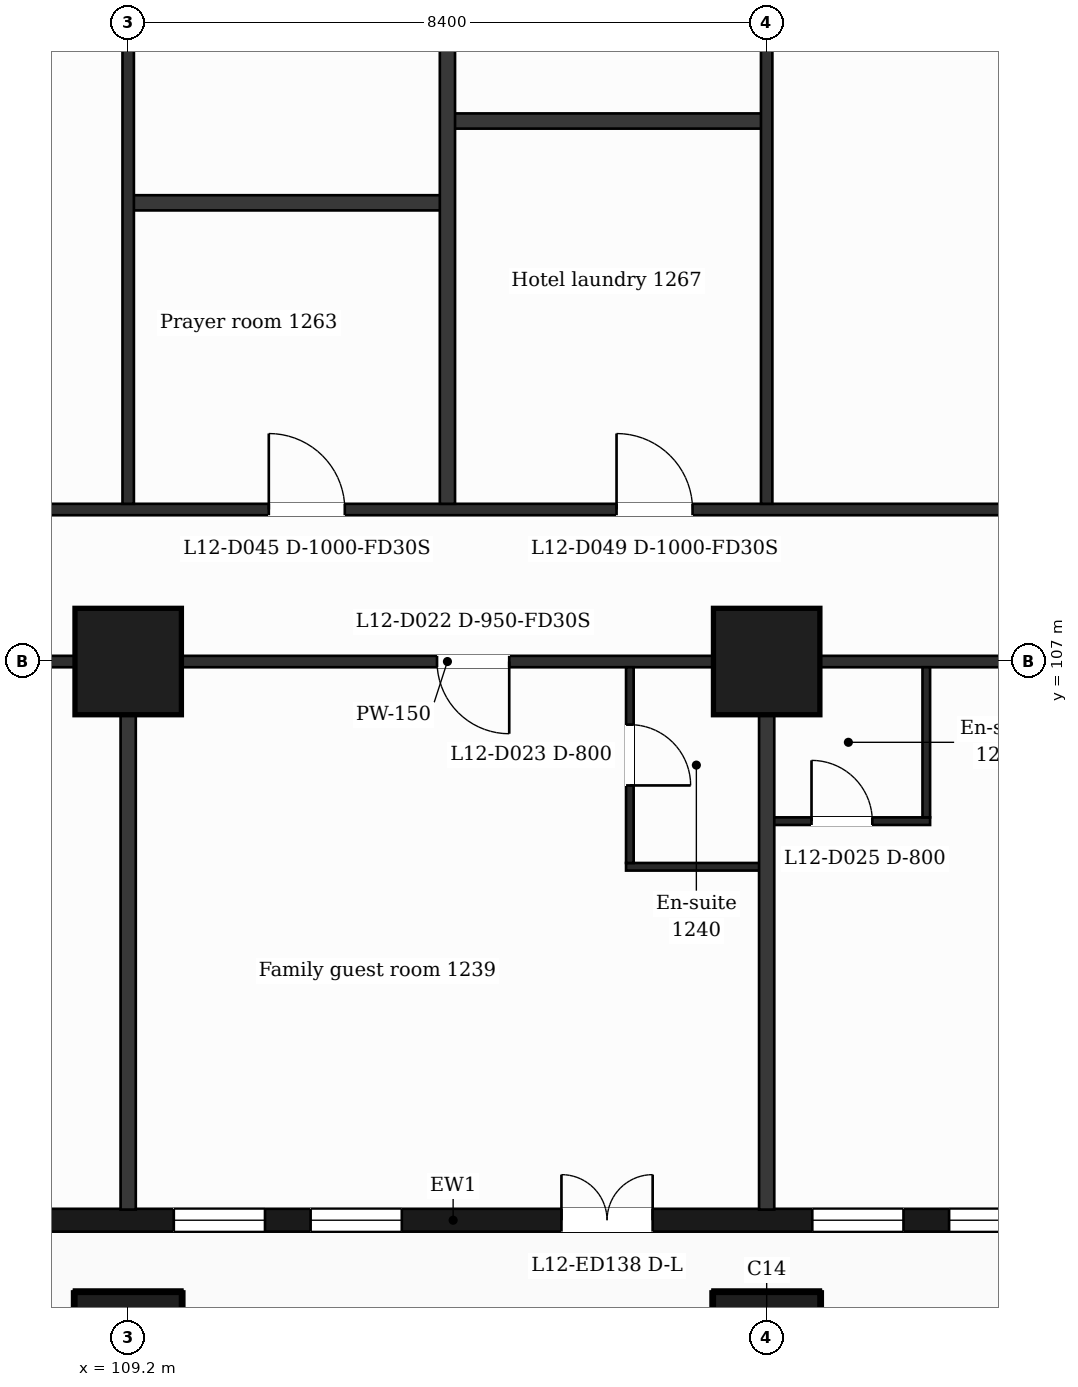
"""IFC4 building model, lengths in metres.
Left out: names, types, materials, properties, quantities, classifications, styles, units other than length and angle.
Written with IfcOpenShell. Run it as: python <this file> out.ifc"""

import sys

from ifc_helpers import new_model, si_unit, direction, frame, frame_2d, origin, origin_2d, place, context, subcontext, project, spatial, rectangle, extrude, element, fill, save


model = new_model("IFC4")
c1 = context("Model", 3, precision=1e-05, world=origin(), true_north=direction((0.0, 1.0)))
c2 = subcontext(c1, "Body", "Model", "MODEL_VIEW")
j1 = project(units=[si_unit("LENGTHUNIT", "METRE"), si_unit("PLANEANGLEUNIT", "RADIAN")], contexts=[c1])
p1 = place(None, origin())
s1 = spatial("IfcSite", under=j1, at=p1, CompositionType="ELEMENT")
p2 = place(p1, origin())
s2 = spatial("IfcBuilding", under=s1, at=p2, CompositionType="ELEMENT")
p3 = place(p2, frame((0.0, 0.0, 60.0)))
s3 = spatial("IfcBuildingStorey", under=s2, at=p3, CompositionType="ELEMENT", Elevation=60.0)
for number, where, z_axis, x_axis in (
    (1, (109.2, 98.0, 0.0), (0.0, 0.0, 1.0), (1.0, 0.0, 0.0)),
    (2, (117.6, 98.0, 0.0), (0.0, 0.0, 1.0), (1.0, 0.0, 0.0)),
    (3, (109.2, 107.0, 0.0), (0.0, 0.0, 1.0), (1.0, 0.0, 0.0)),
    (4, (117.6, 107.0, 0.0), (0.0, 0.0, 1.0), (1.0, 0.0, 0.0)),
):
    element("IfcColumn", number, at=place(p3, frame(where, z_axis=z_axis, x_axis=x_axis)), inside=s3, PredefinedType="COLUMN", context=c2, shape_type="SweptSolid", body=[
        extrude(rectangle(XDim=1.4, YDim=1.4, at=origin_2d()), origin(), (0.0, 0.0, 1.0), 3.5),
    ])
p4 = place(p3, frame((89.85, 99.65, 0.0), z_axis=(0.0, 0.0, 1.0), x_axis=(1.0, 0.0, 0.0)))
e5 = element("IfcWall", 5, at=p4, inside=s3, PredefinedType="SOLIDWALL", context=c2, shape_type="SweptSolid", body=[
    extrude(rectangle(XDim=47.25, YDim=0.3, at=frame_2d((23.625, 0.0))), origin(), (0.0, 0.0, 1.0), 3.18),
])
p5 = place(p4, frame((0.725, 0.0, 0.9)))
e6 = element("IfcOpeningElement", 6, at=p5, cuts=e5, PredefinedType="OPENING", context=c2, shape_type="SweptSolid", body=[
    extrude(rectangle(XDim=1.2, YDim=2.1, at=frame_2d((0.6, 1.05))), frame((0.0, 0.16, 0.0), z_axis=(0.0, -1.0, 0.0), x_axis=(1.0, 0.0, 0.0)), (0.0, 0.0, 1.0), 0.32),
])
p6 = place(p4, frame((3.45, 0.0, 0.9)))
e7 = element("IfcOpeningElement", 7, at=p6, cuts=e5, PredefinedType="OPENING", context=c2, shape_type="SweptSolid", body=[
    extrude(rectangle(XDim=2.4, YDim=2.1, at=frame_2d((1.2, 1.05))), frame((0.0, 0.16, 0.0), z_axis=(0.0, -1.0, 0.0), x_axis=(1.0, 0.0, 0.0)), (0.0, 0.0, 1.0), 0.32),
])
p7 = place(p4, frame((7.65, 0.0, 0.9)))
e8 = element("IfcOpeningElement", 8, at=p7, cuts=e5, PredefinedType="OPENING", context=c2, shape_type="SweptSolid", body=[
    extrude(rectangle(XDim=2.4, YDim=2.1, at=frame_2d((1.2, 1.05))), frame((0.0, 0.16, 0.0), z_axis=(0.0, -1.0, 0.0), x_axis=(1.0, 0.0, 0.0)), (0.0, 0.0, 1.0), 0.32),
])
p8 = place(p4, frame((12.45, 0.0, 0.9)))
e9 = element("IfcOpeningElement", 9, at=p8, cuts=e5, PredefinedType="OPENING", context=c2, shape_type="SweptSolid", body=[
    extrude(rectangle(XDim=1.2, YDim=2.1, at=frame_2d((0.6, 1.05))), frame((0.0, 0.16, 0.0), z_axis=(0.0, -1.0, 0.0), x_axis=(1.0, 0.0, 0.0)), (0.0, 0.0, 1.0), 0.32),
])
p9 = place(p4, frame((16.65, 0.0, 0.9)))
e10 = element("IfcOpeningElement", 10, at=p9, cuts=e5, PredefinedType="OPENING", context=c2, shape_type="SweptSolid", body=[
    extrude(rectangle(XDim=1.2, YDim=2.1, at=frame_2d((0.6, 1.05))), frame((0.0, 0.16, 0.0), z_axis=(0.0, -1.0, 0.0), x_axis=(1.0, 0.0, 0.0)), (0.0, 0.0, 1.0), 0.32),
])
p10 = place(p4, frame((19.95, 0.0, 0.9)))
e11 = element("IfcOpeningElement", 11, at=p10, cuts=e5, PredefinedType="OPENING", context=c2, shape_type="SweptSolid", body=[
    extrude(rectangle(XDim=1.2, YDim=2.1, at=frame_2d((0.6, 1.05))), frame((0.0, 0.16, 0.0), z_axis=(0.0, -1.0, 0.0), x_axis=(1.0, 0.0, 0.0)), (0.0, 0.0, 1.0), 0.32),
])
p11 = place(p4, frame((21.75, 0.0, 0.9)))
e12 = element("IfcOpeningElement", 12, at=p11, cuts=e5, PredefinedType="OPENING", context=c2, shape_type="SweptSolid", body=[
    extrude(rectangle(XDim=1.2, YDim=2.1, at=frame_2d((0.6, 1.05))), frame((0.0, 0.16, 0.0), z_axis=(0.0, -1.0, 0.0), x_axis=(1.0, 0.0, 0.0)), (0.0, 0.0, 1.0), 0.32),
])
p12 = place(p4, frame((25.05, 0.0, 0.0)))
e13 = element("IfcOpeningElement", 13, at=p12, cuts=e5, PredefinedType="OPENING", context=c2, shape_type="SweptSolid", body=[
    extrude(rectangle(XDim=1.2, YDim=2.4, at=frame_2d((0.6, 1.2))), frame((0.0, 0.16, 0.0), z_axis=(0.0, -1.0, 0.0), x_axis=(1.0, 0.0, 0.0)), (0.0, 0.0, 1.0), 0.32),
])
p13 = place(p4, frame((28.35, 0.0, 0.9)))
e14 = element("IfcOpeningElement", 14, at=p13, cuts=e5, PredefinedType="OPENING", context=c2, shape_type="SweptSolid", body=[
    extrude(rectangle(XDim=1.2, YDim=2.1, at=frame_2d((0.6, 1.05))), frame((0.0, 0.16, 0.0), z_axis=(0.0, -1.0, 0.0), x_axis=(1.0, 0.0, 0.0)), (0.0, 0.0, 1.0), 0.32),
])
p14 = place(p4, frame((30.15, 0.0, 0.9)))
e15 = element("IfcOpeningElement", 15, at=p14, cuts=e5, PredefinedType="OPENING", context=c2, shape_type="SweptSolid", body=[
    extrude(rectangle(XDim=1.2, YDim=2.1, at=frame_2d((0.6, 1.05))), frame((0.0, 0.16, 0.0), z_axis=(0.0, -1.0, 0.0), x_axis=(1.0, 0.0, 0.0)), (0.0, 0.0, 1.0), 0.32),
])
p15 = place(p4, frame((32.85, 0.0, 0.9)))
e16 = element("IfcOpeningElement", 16, at=p15, cuts=e5, PredefinedType="OPENING", context=c2, shape_type="SweptSolid", body=[
    extrude(rectangle(XDim=2.4, YDim=2.1, at=frame_2d((1.2, 1.05))), frame((0.0, 0.16, 0.0), z_axis=(0.0, -1.0, 0.0), x_axis=(1.0, 0.0, 0.0)), (0.0, 0.0, 1.0), 0.32),
])
p16 = place(p4, frame((37.05, 0.0, 0.9)))
e17 = element("IfcOpeningElement", 17, at=p16, cuts=e5, PredefinedType="OPENING", context=c2, shape_type="SweptSolid", body=[
    extrude(rectangle(XDim=2.4, YDim=2.1, at=frame_2d((1.2, 1.05))), frame((0.0, 0.16, 0.0), z_axis=(0.0, -1.0, 0.0), x_axis=(1.0, 0.0, 0.0)), (0.0, 0.0, 1.0), 0.32),
])
p17 = place(p4, frame((41.85, 0.0, 0.9)))
e18 = element("IfcOpeningElement", 18, at=p17, cuts=e5, PredefinedType="OPENING", context=c2, shape_type="SweptSolid", body=[
    extrude(rectangle(XDim=1.2, YDim=2.1, at=frame_2d((0.6, 1.05))), frame((0.0, 0.16, 0.0), z_axis=(0.0, -1.0, 0.0), x_axis=(1.0, 0.0, 0.0)), (0.0, 0.0, 1.0), 0.32),
])
p18 = place(p4, frame((45.25, 0.0, 0.9)))
e19 = element("IfcOpeningElement", 19, at=p18, cuts=e5, PredefinedType="OPENING", context=c2, shape_type="SweptSolid", body=[
    extrude(rectangle(XDim=1.2, YDim=2.1, at=frame_2d((0.6, 1.05))), frame((0.0, 0.16, 0.0), z_axis=(0.0, -1.0, 0.0), x_axis=(1.0, 0.0, 0.0)), (0.0, 0.0, 1.0), 0.32),
])
p19 = place(p3, frame((115.75, 104.3, 0.0), z_axis=(0.0, 0.0, 1.0), x_axis=(1.0, 0.0, 0.0)))
e20 = element("IfcWall", 20, at=p19, inside=s3, PredefinedType="PARTITIONING", context=c2, shape_type="SweptSolid", body=[
    extrude(rectangle(XDim=1.85, YDim=0.1, at=frame_2d((0.925, 0.0))), origin(), (0.0, 0.0, 1.0), 3.18),
])
p20 = place(p3, frame((117.6, 104.9, 0.0), z_axis=(0.0, 0.0, 1.0), x_axis=(1.0, 0.0, 0.0)))
e21 = element("IfcWall", 21, at=p20, inside=s3, PredefinedType="PARTITIONING", context=c2, shape_type="SweptSolid", body=[
    extrude(rectangle(XDim=2.15, YDim=0.1, at=frame_2d((1.075, 0.0))), origin(), (0.0, 0.0, 1.0), 3.18),
])
p21 = place(p20, frame((0.59, 0.0, 0.0)))
e22 = element("IfcOpeningElement", 22, at=p21, cuts=e21, PredefinedType="OPENING", context=c2, shape_type="SweptSolid", body=[
    extrude(rectangle(XDim=0.8, YDim=2.1, at=frame_2d((0.4, 1.05))), frame((0.0, 0.06, 0.0), z_axis=(0.0, -1.0, 0.0), x_axis=(1.0, 0.0, 0.0)), (0.0, 0.0, 1.0), 0.12),
])
p22 = place(p3, frame((87.018, 107.0, 0.0), z_axis=(0.0, 0.0, 1.0), x_axis=(1.0, 0.0, 0.0)))
e23 = element("IfcWall", 23, at=p22, inside=s3, PredefinedType="PARTITIONING", context=c2, shape_type="SweptSolid", body=[
    extrude(rectangle(XDim=52.765, YDim=0.15, at=frame_2d((26.382, 0.0))), origin(), (0.0, 0.0, 1.0), 3.18),
])
p23 = place(p22, frame((1.032, 0.0, 0.0)))
e24 = element("IfcOpeningElement", 24, at=p23, cuts=e23, PredefinedType="OPENING", context=c2, shape_type="SweptSolid", body=[
    extrude(rectangle(XDim=0.95, YDim=2.1, at=frame_2d((0.475, 1.05))), frame((0.0, 0.085, 0.0), z_axis=(0.0, -1.0, 0.0), x_axis=(1.0, 0.0, 0.0)), (0.0, 0.0, 1.0), 0.17),
])
p24 = place(p22, frame((6.894, 0.0, 0.0)))
e25 = element("IfcOpeningElement", 25, at=p24, cuts=e23, PredefinedType="OPENING", context=c2, shape_type="SweptSolid", body=[
    extrude(rectangle(XDim=0.95, YDim=2.1, at=frame_2d((0.475, 1.05))), frame((0.0, 0.085, 0.0), z_axis=(0.0, -1.0, 0.0), x_axis=(1.0, 0.0, 0.0)), (0.0, 0.0, 1.0), 0.17),
])
p25 = place(p22, frame((17.844, 0.0, 0.0)))
e26 = element("IfcOpeningElement", 26, at=p25, cuts=e23, PredefinedType="OPENING", context=c2, shape_type="SweptSolid", body=[
    extrude(rectangle(XDim=0.95, YDim=2.1, at=frame_2d((0.475, 1.05))), frame((0.0, 0.085, 0.0), z_axis=(0.0, -1.0, 0.0), x_axis=(1.0, 0.0, 0.0)), (0.0, 0.0, 1.0), 0.17),
])
p26 = place(p22, frame((26.245, 0.0, 0.0)))
e27 = element("IfcOpeningElement", 27, at=p26, cuts=e23, PredefinedType="OPENING", context=c2, shape_type="SweptSolid", body=[
    extrude(rectangle(XDim=0.95, YDim=2.1, at=frame_2d((0.475, 1.05))), frame((0.0, 0.085, 0.0), z_axis=(0.0, -1.0, 0.0), x_axis=(1.0, 0.0, 0.0)), (0.0, 0.0, 1.0), 0.17),
])
p27 = place(p22, frame((35.822, 0.0, 0.0)))
e28 = element("IfcOpeningElement", 28, at=p27, cuts=e23, PredefinedType="OPENING", context=c2, shape_type="SweptSolid", body=[
    extrude(rectangle(XDim=0.95, YDim=2.1, at=frame_2d((0.475, 1.05))), frame((0.0, 0.085, 0.0), z_axis=(0.0, -1.0, 0.0), x_axis=(1.0, 0.0, 0.0)), (0.0, 0.0, 1.0), 0.17),
])
p28 = place(p22, frame((42.302, 0.0, 0.0)))
e29 = element("IfcOpeningElement", 29, at=p28, cuts=e23, PredefinedType="OPENING", context=c2, shape_type="SweptSolid", body=[
    extrude(rectangle(XDim=0.95, YDim=2.1, at=frame_2d((0.475, 1.05))), frame((0.0, 0.085, 0.0), z_axis=(0.0, -1.0, 0.0), x_axis=(1.0, 0.0, 0.0)), (0.0, 0.0, 1.0), 0.17),
])
p29 = place(p22, frame((49.285, 0.0, 0.0)))
e30 = element("IfcOpeningElement", 30, at=p29, cuts=e23, PredefinedType="OPENING", context=c2, shape_type="SweptSolid", body=[
    extrude(rectangle(XDim=0.95, YDim=2.1, at=frame_2d((0.475, 1.05))), frame((0.0, 0.085, 0.0), z_axis=(0.0, -1.0, 0.0), x_axis=(1.0, 0.0, 0.0)), (0.0, 0.0, 1.0), 0.17),
])
p30 = place(p3, frame((100.725, 109.0, 0.0), z_axis=(0.0, 0.0, 1.0), x_axis=(1.0, 0.0, 0.0)))
e31 = element("IfcWall", 31, at=p30, inside=s3, PredefinedType="PARTITIONING", context=c2, shape_type="SweptSolid", body=[
    extrude(rectangle(XDim=25.35, YDim=0.15, at=frame_2d((12.675, 0.0))), origin(), (0.0, 0.0, 1.0), 3.18),
])
p31 = place(p30, frame((1.975, 0.0, 0.0)))
e32 = element("IfcOpeningElement", 32, at=p31, cuts=e31, PredefinedType="OPENING", context=c2, shape_type="SweptSolid", body=[
    extrude(rectangle(XDim=1.0, YDim=2.1, at=frame_2d((0.5, 1.05))), frame((0.0, 0.085, 0.0), z_axis=(0.0, -1.0, 0.0), x_axis=(1.0, 0.0, 0.0)), (0.0, 0.0, 1.0), 0.17),
])
p32 = place(p30, frame((10.325, 0.0, 0.0)))
e33 = element("IfcOpeningElement", 33, at=p32, cuts=e31, PredefinedType="OPENING", context=c2, shape_type="SweptSolid", body=[
    extrude(rectangle(XDim=1.0, YDim=2.1, at=frame_2d((0.5, 1.05))), frame((0.0, 0.085, 0.0), z_axis=(0.0, -1.0, 0.0), x_axis=(1.0, 0.0, 0.0)), (0.0, 0.0, 1.0), 0.17),
])
p33 = place(p30, frame((14.9, 0.0, 0.0)))
e34 = element("IfcOpeningElement", 34, at=p33, cuts=e31, PredefinedType="OPENING", context=c2, shape_type="SweptSolid", body=[
    extrude(rectangle(XDim=1.0, YDim=2.1, at=frame_2d((0.5, 1.05))), frame((0.0, 0.085, 0.0), z_axis=(0.0, -1.0, 0.0), x_axis=(1.0, 0.0, 0.0)), (0.0, 0.0, 1.0), 0.17),
])
p34 = place(p30, frame((22.685, 0.0, 0.0)))
e35 = element("IfcOpeningElement", 35, at=p34, cuts=e31, PredefinedType="OPENING", context=c2, shape_type="SweptSolid", body=[
    extrude(rectangle(XDim=1.0, YDim=2.1, at=frame_2d((0.5, 1.05))), frame((0.0, 0.085, 0.0), z_axis=(0.0, -1.0, 0.0), x_axis=(1.0, 0.0, 0.0)), (0.0, 0.0, 1.0), 0.17),
])
p35 = place(p3, frame((109.2, 113.035, 0.0), z_axis=(0.0, 0.0, 1.0), x_axis=(1.0, 0.0, 0.0)))
e36 = element("IfcWall", 36, at=p35, inside=s3, PredefinedType="PARTITIONING", context=c2, shape_type="SweptSolid", body=[
    extrude(rectangle(XDim=4.2, YDim=0.2, at=frame_2d((2.1, 0.0))), origin(), (0.0, 0.0, 1.0), 3.18),
])
p36 = place(p3, frame((113.4, 114.111, 0.0), z_axis=(0.0, 0.0, 1.0), x_axis=(1.0, 0.0, 0.0)))
e37 = element("IfcWall", 37, at=p36, inside=s3, PredefinedType="PARTITIONING", context=c2, shape_type="SweptSolid", body=[
    extrude(rectangle(XDim=4.2, YDim=0.2, at=frame_2d((2.1, 0.0))), origin(), (0.0, 0.0, 1.0), 3.18),
])
p37 = place(p3, frame((109.2, 99.79, 0.0), z_axis=(0.0, 0.0, 1.0), x_axis=(0.0, 1.0, 0.0)))
e38 = element("IfcWall", 38, at=p37, inside=s3, PredefinedType="PARTITIONING", context=c2, shape_type="SweptSolid", body=[
    extrude(rectangle(XDim=7.135, YDim=0.2, at=frame_2d((3.567, 0.0))), origin(), (0.0, 0.0, 1.0), 3.18),
])
p38 = place(p3, frame((109.2, 109.075, 0.0), z_axis=(0.0, 0.0, 1.0), x_axis=(0.0, 1.0, 0.0)))
e39 = element("IfcWall", 39, at=p38, inside=s3, PredefinedType="PARTITIONING", context=c2, shape_type="SweptSolid", body=[
    extrude(rectangle(XDim=13.3, YDim=0.15, at=frame_2d((6.65, 0.0))), origin(), (0.0, 0.0, 1.0), 3.18),
])
p39 = place(p38, frame((8.939, 0.0, 0.0)))
e40 = element("IfcOpeningElement", 40, at=p39, cuts=e39, PredefinedType="OPENING", context=c2, shape_type="SweptSolid", body=[
    extrude(rectangle(XDim=1.0, YDim=2.1, at=frame_2d((0.5, 1.05))), frame((0.0, 0.085, 0.0), z_axis=(0.0, -1.0, 0.0), x_axis=(1.0, 0.0, 0.0)), (0.0, 0.0, 1.0), 0.17),
])
p40 = place(p3, frame((113.4, 109.075, 0.0), z_axis=(0.0, 0.0, 1.0), x_axis=(0.0, 1.0, 0.0)))
e41 = element("IfcWall", 41, at=p40, inside=s3, PredefinedType="PARTITIONING", context=c2, shape_type="SweptSolid", body=[
    extrude(rectangle(XDim=13.3, YDim=0.2, at=frame_2d((6.65, 0.0))), origin(), (0.0, 0.0, 1.0), 3.18),
])
p41 = place(p3, frame((115.8, 104.35, 0.0), z_axis=(0.0, 0.0, 1.0), x_axis=(0.0, 1.0, 0.0)))
e42 = element("IfcWall", 42, at=p41, inside=s3, PredefinedType="PARTITIONING", context=c2, shape_type="SweptSolid", body=[
    extrude(rectangle(XDim=2.575, YDim=0.1, at=frame_2d((1.288, 0.0))), origin(), (0.0, 0.0, 1.0), 3.18),
])
p42 = place(p41, frame((1.02, 0.0, 0.0)))
e43 = element("IfcOpeningElement", 43, at=p42, cuts=e42, PredefinedType="OPENING", context=c2, shape_type="SweptSolid", body=[
    extrude(rectangle(XDim=0.8, YDim=2.1, at=frame_2d((0.4, 1.05))), frame((0.0, 0.06, 0.0), z_axis=(0.0, -1.0, 0.0), x_axis=(1.0, 0.0, 0.0)), (0.0, 0.0, 1.0), 0.12),
])
p43 = place(p3, frame((117.6, 99.79, 0.0), z_axis=(0.0, 0.0, 1.0), x_axis=(0.0, 1.0, 0.0)))
e44 = element("IfcWall", 44, at=p43, inside=s3, PredefinedType="PARTITIONING", context=c2, shape_type="SweptSolid", body=[
    extrude(rectangle(XDim=7.135, YDim=0.2, at=frame_2d((3.567, 0.0))), origin(), (0.0, 0.0, 1.0), 3.18),
])
p44 = place(p3, frame((117.6, 109.075, 0.0), z_axis=(0.0, 0.0, 1.0), x_axis=(0.0, 1.0, 0.0)))
e45 = element("IfcWall", 45, at=p44, inside=s3, PredefinedType="PARTITIONING", context=c2, shape_type="SweptSolid", body=[
    extrude(rectangle(XDim=13.3, YDim=0.15, at=frame_2d((6.65, 0.0))), origin(), (0.0, 0.0, 1.0), 3.18),
])
p45 = place(p44, frame((8.042, 0.0, 0.0)))
e46 = element("IfcOpeningElement", 46, at=p45, cuts=e45, PredefinedType="OPENING", context=c2, shape_type="SweptSolid", body=[
    extrude(rectangle(XDim=1.0, YDim=2.1, at=frame_2d((0.5, 1.05))), frame((0.0, 0.085, 0.0), z_axis=(0.0, -1.0, 0.0), x_axis=(1.0, 0.0, 0.0)), (0.0, 0.0, 1.0), 0.17),
])
p46 = place(p3, frame((119.7, 104.95, 0.0), z_axis=(0.0, 0.0, 1.0), x_axis=(0.0, 1.0, 0.0)))
e47 = element("IfcWall", 47, at=p46, inside=s3, PredefinedType="PARTITIONING", context=c2, shape_type="SweptSolid", body=[
    extrude(rectangle(XDim=1.975, YDim=0.1, at=frame_2d((0.988, 0.0))), origin(), (0.0, 0.0, 1.0), 3.18),
])
p47 = place(p10, origin())
e48 = element("IfcWindow", 48, at=p47, inside=s3, PartitioningType="SINGLE_PANEL", PredefinedType="WINDOW", context=c2, shape_type="SweptSolid", body=[
    extrude(rectangle(XDim=1.2, YDim=2.1, at=frame_2d((0.6, 1.05))), frame((0.0, 0.03, 0.0), z_axis=(0.0, -1.0, 0.0), x_axis=(1.0, 0.0, 0.0)), (0.0, 0.0, 1.0), 0.06),
])
fill(e11, e48)
p48 = place(p11, origin())
e49 = element("IfcWindow", 49, at=p48, inside=s3, PartitioningType="SINGLE_PANEL", PredefinedType="WINDOW", context=c2, shape_type="SweptSolid", body=[
    extrude(rectangle(XDim=1.2, YDim=2.1, at=frame_2d((0.6, 1.05))), frame((0.0, 0.03, 0.0), z_axis=(0.0, -1.0, 0.0), x_axis=(1.0, 0.0, 0.0)), (0.0, 0.0, 1.0), 0.06),
])
fill(e12, e49)
p49 = place(p12, origin())
e50 = element("IfcDoor", 50, at=p49, inside=s3, OperationType="DOUBLE_DOOR_SINGLE_SWING", PredefinedType="DOOR", context=c2, shape_type="SweptSolid", body=[
    extrude(rectangle(XDim=1.2, YDim=2.4, at=frame_2d((0.6, 1.2))), frame((0.0, 0.025, 0.0), z_axis=(0.0, -1.0, 0.0), x_axis=(1.0, 0.0, 0.0)), (0.0, 0.0, 1.0), 0.05),
])
fill(e13, e50)
p50 = place(p13, origin())
e51 = element("IfcWindow", 51, at=p50, inside=s3, PartitioningType="SINGLE_PANEL", PredefinedType="WINDOW", context=c2, shape_type="SweptSolid", body=[
    extrude(rectangle(XDim=1.2, YDim=2.1, at=frame_2d((0.6, 1.05))), frame((0.0, 0.03, 0.0), z_axis=(0.0, -1.0, 0.0), x_axis=(1.0, 0.0, 0.0)), (0.0, 0.0, 1.0), 0.06),
])
fill(e14, e51)
p51 = place(p14, origin())
e52 = element("IfcWindow", 52, at=p51, inside=s3, PartitioningType="SINGLE_PANEL", PredefinedType="WINDOW", context=c2, shape_type="SweptSolid", body=[
    extrude(rectangle(XDim=1.2, YDim=2.1, at=frame_2d((0.6, 1.05))), frame((0.0, 0.03, 0.0), z_axis=(0.0, -1.0, 0.0), x_axis=(1.0, 0.0, 0.0)), (0.0, 0.0, 1.0), 0.06),
])
fill(e15, e52)
p52 = place(p26, origin())
e53 = element("IfcDoor", 53, at=p52, inside=s3, OperationType="SINGLE_SWING_RIGHT", PredefinedType="DOOR", context=c2, shape_type="SweptSolid", body=[
    extrude(rectangle(XDim=0.95, YDim=2.1, at=frame_2d((0.475, 1.05))), frame((0.0, 0.025, 0.0), z_axis=(0.0, -1.0, 0.0), x_axis=(1.0, 0.0, 0.0)), (0.0, 0.0, 1.0), 0.05),
])
fill(e27, e53)
p53 = place(p42, origin())
e54 = element("IfcDoor", 54, at=p53, inside=s3, OperationType="SINGLE_SWING_LEFT", PredefinedType="DOOR", context=c2, shape_type="SweptSolid", body=[
    extrude(rectangle(XDim=0.8, YDim=2.1, at=frame_2d((0.4, 1.05))), frame((0.0, 0.025, 0.0), z_axis=(0.0, -1.0, 0.0), x_axis=(1.0, 0.0, 0.0)), (0.0, 0.0, 1.0), 0.05),
])
fill(e43, e54)
p54 = place(p21, origin())
e55 = element("IfcDoor", 55, at=p54, inside=s3, OperationType="SINGLE_SWING_LEFT", PredefinedType="DOOR", context=c2, shape_type="SweptSolid", body=[
    extrude(rectangle(XDim=0.8, YDim=2.1, at=frame_2d((0.4, 1.05))), frame((0.0, 0.025, 0.0), z_axis=(0.0, -1.0, 0.0), x_axis=(1.0, 0.0, 0.0)), (0.0, 0.0, 1.0), 0.05),
])
fill(e22, e55)
p55 = place(p32, origin())
e56 = element("IfcDoor", 56, at=p55, inside=s3, OperationType="SINGLE_SWING_LEFT", PredefinedType="DOOR", context=c2, shape_type="SweptSolid", body=[
    extrude(rectangle(XDim=1.0, YDim=2.1, at=frame_2d((0.5, 1.05))), frame((0.0, 0.025, 0.0), z_axis=(0.0, -1.0, 0.0), x_axis=(1.0, 0.0, 0.0)), (0.0, 0.0, 1.0), 0.05),
])
fill(e33, e56)
p56 = place(p33, origin())
e57 = element("IfcDoor", 57, at=p56, inside=s3, OperationType="SINGLE_SWING_LEFT", PredefinedType="DOOR", context=c2, shape_type="SweptSolid", body=[
    extrude(rectangle(XDim=1.0, YDim=2.1, at=frame_2d((0.5, 1.05))), frame((0.0, 0.025, 0.0), z_axis=(0.0, -1.0, 0.0), x_axis=(1.0, 0.0, 0.0)), (0.0, 0.0, 1.0), 0.05),
])
fill(e34, e57)
save(model, sys.argv[1])
